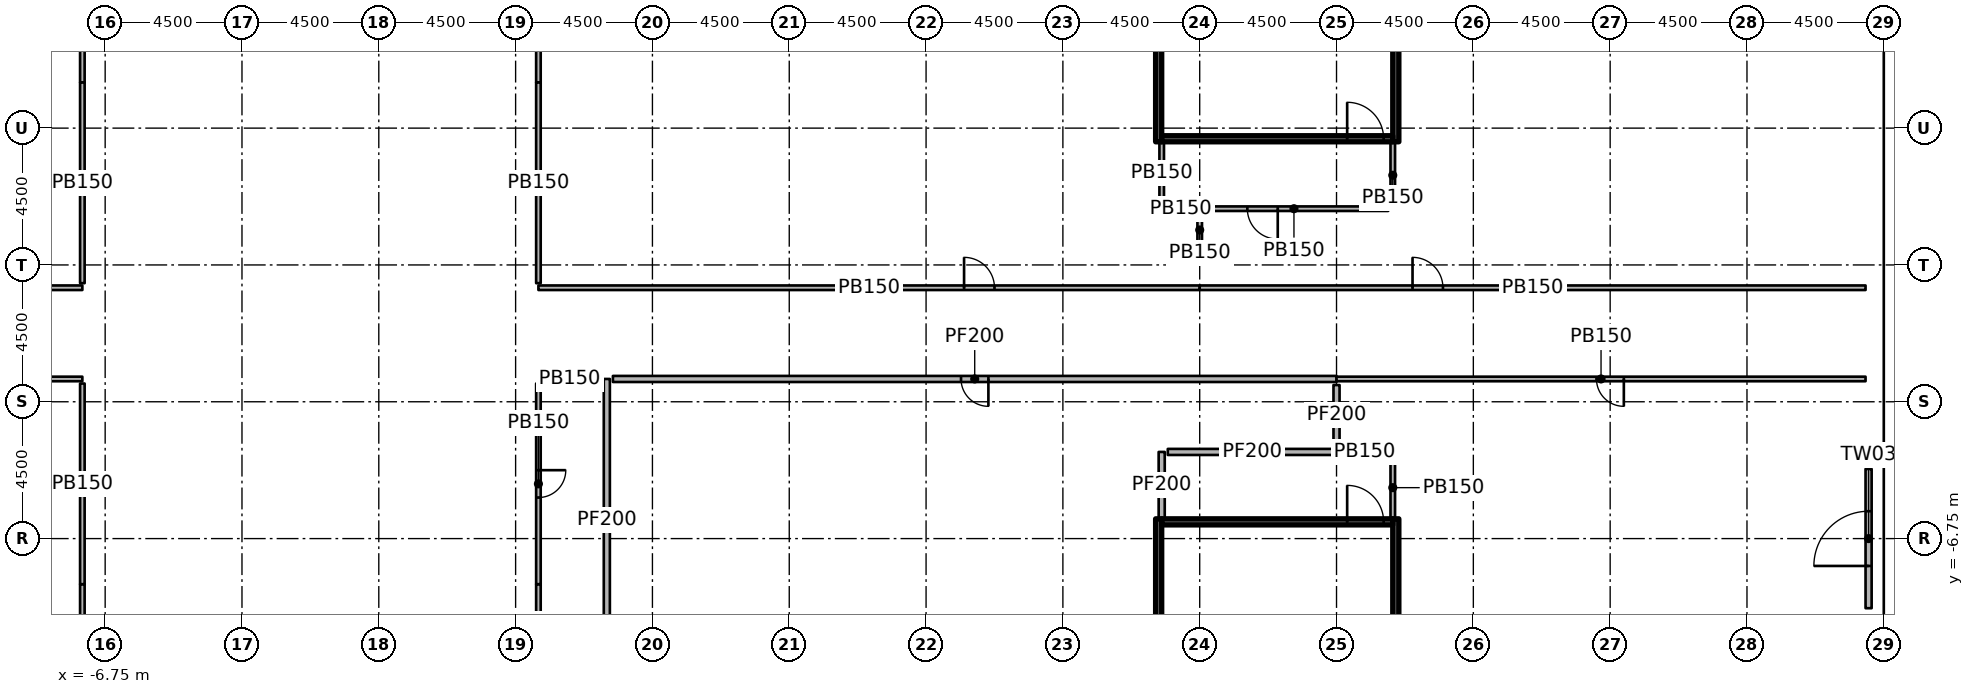
"""IFC4 building model, lengths in metres.
Left out: names, types, materials, properties, quantities, classifications, styles, units other than length and angle.
Written with IfcOpenShell. Run it as: python <this file> out.ifc"""

import sys

from ifc_helpers import new_model, si_unit, direction, frame, frame_2d, origin, origin_2d, place, context, subcontext, project, spatial, rectangle, extrude, element, fill, save


model = new_model("IFC4")
c1 = context("Model", 3, precision=1e-05, world=origin(), true_north=direction((0.0, 1.0)))
c2 = subcontext(c1, "Body", "Model", "MODEL_VIEW")
j1 = project(units=[si_unit("LENGTHUNIT", "METRE"), si_unit("PLANEANGLEUNIT", "RADIAN")], contexts=[c1])
p1 = place(None, origin())
s1 = spatial("IfcSite", under=j1, at=p1, CompositionType="ELEMENT")
p2 = place(p1, origin())
s2 = spatial("IfcBuilding", under=s1, at=p2, CompositionType="ELEMENT")
p3 = place(p2, frame((0.0, 0.0, 7.0)))
s3 = spatial("IfcBuildingStorey", under=s2, at=p3, CompositionType="ELEMENT", Elevation=7.0)
for number, where, z_axis, x_axis in (
    (1, (-6.25, -6.25, 0.0), (0.0, 0.0, 1.0), (1.0, 0.0, 0.0)),
    (2, (-6.25, 6.25, 0.0), (0.0, 0.0, 1.0), (1.0, 0.0, 0.0)),
    (3, (6.25, -6.25, 0.0), (0.0, 0.0, 1.0), (1.0, 0.0, 0.0)),
    (4, (6.25, 6.25, 0.0), (0.0, 0.0, 1.0), (1.0, 0.0, 0.0)),
    (5, (10.75, -6.25, 0.0), (0.0, 0.0, 1.0), (1.0, 0.0, 0.0)),
    (6, (10.75, 6.25, 0.0), (0.0, 0.0, 1.0), (1.0, 0.0, 0.0)),
    (7, (15.75, -6.25, 0.0), (0.0, 0.0, 1.0), (1.0, 0.0, 0.0)),
    (8, (15.75, 6.25, 0.0), (0.0, 0.0, 1.0), (1.0, 0.0, 0.0)),
    (9, (20.25, -6.11, 0.0), (0.0, 0.0, 1.0), (1.0, 0.0, 0.0)),
    (10, (20.25, 6.11, 0.0), (0.0, 0.0, 1.0), (1.0, 0.0, 0.0)),
    (11, (24.75, -6.11, 0.0), (0.0, 0.0, 1.0), (1.0, 0.0, 0.0)),
    (12, (24.75, 6.11, 0.0), (0.0, 0.0, 1.0), (1.0, 0.0, 0.0)),
    (13, (28.908, -5.475, 0.0), (0.0, 0.0, 1.0), (1.0, 0.0, 0.0)),
    (14, (28.67, -2.25, 0.0), (0.0, 0.0, 1.0), (1.0, 0.0, 0.0)),
    (15, (28.67, 2.25, 0.0), (0.0, 0.0, 1.0), (1.0, 0.0, 0.0)),
    (16, (28.908, 5.475, 0.0), (0.0, 0.0, 1.0), (1.0, 0.0, 0.0)),
    (17, (33.11, -2.25, 0.0), (0.0, 0.0, 1.0), (1.0, 0.0, 0.0)),
    (18, (33.11, 2.25, 0.0), (0.0, 0.0, 1.0), (1.0, 0.0, 0.0)),
    (19, (37.47, 6.75, 0.0), (0.0, 0.0, 1.0), (1.0, 0.0, 0.0)),
    (20, (42.15, 2.25, 0.0), (0.0, 0.0, 1.0), (1.0, 0.0, 0.0)),
    (21, (46.65, -2.25, 0.0), (0.0, 0.0, 1.0), (1.0, 0.0, 0.0)),
    (22, (51.15, 6.75, 0.0), (0.0, 0.0, 1.0), (1.0, 0.0, 0.0)),
):
    element("IfcColumn", number, at=place(p3, frame(where, z_axis=z_axis, x_axis=x_axis)), inside=s3, PredefinedType="COLUMN", context=c2, shape_type="SweptSolid", body=[
        extrude(rectangle(XDim=1.2, YDim=1.2, at=origin_2d()), origin(), (0.0, 0.0, 1.0), 4.55),
    ])
p4 = place(p3, frame((51.25, -9.04, 0.0), z_axis=(0.0, 0.0, 1.0), x_axis=(0.0, 1.0, 0.0)))
e23 = element("IfcWall", 23, at=p4, inside=s3, PredefinedType="SOLIDWALL", context=c2, shape_type="SweptSolid", body=[
    extrude(rectangle(XDim=4.58, YDim=0.2, at=frame_2d((2.29, 0.0))), origin(), (0.0, 0.0, 1.0), 4.55),
])
p5 = place(p4, frame((1.39, 0.0, 0.0)))
e24 = element("IfcOpeningElement", 24, at=p5, cuts=e23, PredefinedType="OPENING", context=c2, shape_type="SweptSolid", body=[
    extrude(rectangle(XDim=1.8, YDim=2.4, at=frame_2d((0.9, 1.2))), frame((0.0, 0.11, 0.0), z_axis=(0.0, -1.0, 0.0), x_axis=(1.0, 0.0, 0.0)), (0.0, 0.0, 1.0), 0.22),
])
for number, where, z_axis, x_axis in (
    (25, (27.9, 6.3, 0.0), (0.0, 0.0, 1.0), (0.0, 1.0, 0.0)),
    (26, (35.7, 6.3, 0.0), (0.0, 0.0, 1.0), (0.0, 1.0, 0.0)),
):
    element("IfcWall", number, at=place(p3, frame(where, z_axis=z_axis, x_axis=x_axis)), inside=s3, PredefinedType="SHEAR", context=c2, shape_type="SweptSolid", body=[
        extrude(rectangle(XDim=4.6, YDim=0.2, at=frame_2d((2.3, 0.0))), origin(), (0.0, 0.0, 1.0), 4.55),
    ])
p6 = place(p3, frame((28.0, 6.4, 0.0), z_axis=(0.0, 0.0, 1.0), x_axis=(1.0, 0.0, 0.0)))
e27 = element("IfcWall", 27, at=p6, inside=s3, PredefinedType="SHEAR", context=c2, shape_type="SweptSolid", body=[
    extrude(rectangle(XDim=7.6, YDim=0.2, at=frame_2d((3.8, 0.0))), origin(), (0.0, 0.0, 1.0), 4.55),
])
p7 = place(p6, frame((6.1, 0.0, 0.0)))
e28 = element("IfcOpeningElement", 28, at=p7, cuts=e27, PredefinedType="OPENING", context=c2, shape_type="SweptSolid", body=[
    extrude(rectangle(XDim=1.2, YDim=2.1, at=frame_2d((0.6, 1.05))), frame((0.0, 0.11, 0.0), z_axis=(0.0, -1.0, 0.0), x_axis=(1.0, 0.0, 0.0)), (0.0, 0.0, 1.0), 0.22),
])
for number, where, z_axis, x_axis in (
    (29, (27.9, -10.7, 0.0), (0.0, 0.0, 1.0), (0.0, 1.0, 0.0)),
    (30, (35.7, -10.7, 0.0), (0.0, 0.0, 1.0), (0.0, 1.0, 0.0)),
):
    element("IfcWall", number, at=place(p3, frame(where, z_axis=z_axis, x_axis=x_axis)), inside=s3, PredefinedType="SHEAR", context=c2, shape_type="SweptSolid", body=[
        extrude(rectangle(XDim=4.6, YDim=0.2, at=frame_2d((2.3, 0.0))), origin(), (0.0, 0.0, 1.0), 4.55),
    ])
p8 = place(p3, frame((28.0, -6.2, 0.0), z_axis=(0.0, 0.0, 1.0), x_axis=(1.0, 0.0, 0.0)))
e31 = element("IfcWall", 31, at=p8, inside=s3, PredefinedType="SHEAR", context=c2, shape_type="SweptSolid", body=[
    extrude(rectangle(XDim=7.6, YDim=0.2, at=frame_2d((3.8, 0.0))), origin(), (0.0, 0.0, 1.0), 4.55),
])
p9 = place(p8, frame((6.1, 0.0, 0.0)))
e32 = element("IfcOpeningElement", 32, at=p9, cuts=e31, PredefinedType="OPENING", context=c2, shape_type="SweptSolid", body=[
    extrude(rectangle(XDim=1.2, YDim=2.1, at=frame_2d((0.6, 1.05))), frame((0.0, 0.11, 0.0), z_axis=(0.0, -1.0, 0.0), x_axis=(1.0, 0.0, 0.0)), (0.0, 0.0, 1.0), 0.22),
])
p10 = place(p3, frame((29.25, 4.1, 0.0), z_axis=(0.0, 0.0, 1.0), x_axis=(-1.0, 0.0, 0.0)))
e33 = element("IfcWall", 33, at=p10, inside=s3, PredefinedType="PARTITIONING", context=c2, shape_type="SweptSolid", body=[
    extrude(rectangle(XDim=1.25, YDim=0.15, at=frame_2d((0.625, 0.0))), origin(), (0.0, 0.0, 1.0), 4.55),
])
p11 = place(p3, frame((28.0, 4.25, 0.0), z_axis=(0.0, 0.0, 1.0), x_axis=(0.0, 1.0, 0.0)))
e34 = element("IfcWall", 34, at=p11, inside=s3, PredefinedType="PARTITIONING", context=c2, shape_type="SweptSolid", body=[
    extrude(rectangle(XDim=2.05, YDim=0.15, at=frame_2d((1.025, 0.0))), origin(), (0.0, 0.0, 1.0), 4.55),
])
p12 = place(p3, frame((35.6, 6.3, 0.0), z_axis=(0.0, 0.0, 1.0), x_axis=(0.0, -1.0, 0.0)))
e35 = element("IfcWall", 35, at=p12, inside=s3, PredefinedType="PARTITIONING", context=c2, shape_type="SweptSolid", body=[
    extrude(rectangle(XDim=2.2, YDim=0.15, at=frame_2d((1.1, 0.0))), origin(), (0.0, 0.0, 1.0), 4.55),
])
p13 = place(p3, frame((35.45, 4.1, 0.0), z_axis=(0.0, 0.0, 1.0), x_axis=(-1.0, 0.0, 0.0)))
e36 = element("IfcWall", 36, at=p13, inside=s3, PredefinedType="PARTITIONING", context=c2, shape_type="SweptSolid", body=[
    extrude(rectangle(XDim=6.2, YDim=0.15, at=frame_2d((3.1, 0.0))), origin(), (0.0, 0.0, 1.0), 4.55),
])
p14 = place(p13, frame((3.633, 0.0, 0.0)))
e37 = element("IfcOpeningElement", 37, at=p14, cuts=e36, PredefinedType="OPENING", context=c2, shape_type="SweptSolid", body=[
    extrude(rectangle(XDim=1.0, YDim=2.1, at=frame_2d((0.5, 1.05))), frame((0.0, 0.085, 0.0), z_axis=(0.0, -1.0, 0.0), x_axis=(1.0, 0.0, 0.0)), (0.0, 0.0, 1.0), 0.17),
])
p15 = place(p3, frame((28.0, -6.1, 0.0), z_axis=(0.0, 0.0, 1.0), x_axis=(0.0, 1.0, 0.0)))
e38 = element("IfcWall", 38, at=p15, inside=s3, PredefinedType="PARTITIONING", context=c2, shape_type="SweptSolid", body=[
    extrude(rectangle(XDim=2.2, YDim=0.2, at=frame_2d((1.1, 0.0))), origin(), (0.0, 0.0, 1.0), 4.55),
])
p16 = place(p3, frame((28.2, -3.9, 0.0), z_axis=(0.0, 0.0, 1.0), x_axis=(1.0, 0.0, 0.0)))
e39 = element("IfcWall", 39, at=p16, inside=s3, PredefinedType="PARTITIONING", context=c2, shape_type="SweptSolid", body=[
    extrude(rectangle(XDim=5.55, YDim=0.2, at=frame_2d((2.775, 0.0))), origin(), (0.0, 0.0, 1.0), 4.55),
])
p17 = place(p3, frame((33.75, -3.9, 0.0), z_axis=(0.0, 0.0, 1.0), x_axis=(1.0, 0.0, 0.0)))
e40 = element("IfcWall", 40, at=p17, inside=s3, PredefinedType="PARTITIONING", context=c2, shape_type="SweptSolid", body=[
    extrude(rectangle(XDim=1.85, YDim=0.15, at=frame_2d((0.925, 0.0))), origin(), (0.0, 0.0, 1.0), 4.55),
])
p18 = place(p3, frame((35.6, -4.05, 0.0), z_axis=(0.0, 0.0, 1.0), x_axis=(0.0, -1.0, 0.0)))
e41 = element("IfcWall", 41, at=p18, inside=s3, PredefinedType="PARTITIONING", context=c2, shape_type="SweptSolid", body=[
    extrude(rectangle(XDim=2.05, YDim=0.15, at=frame_2d((1.025, 0.0))), origin(), (0.0, 0.0, 1.0), 4.55),
])
p19 = place(p3, frame((9.75, -10.8, 0.0), z_axis=(0.0, 0.0, 1.0), x_axis=(0.0, 1.0, 0.0)))
e42 = element("IfcWall", 42, at=p19, inside=s3, PredefinedType="PARTITIONING", context=c2, shape_type="SweptSolid", body=[
    extrude(rectangle(XDim=9.3, YDim=0.2, at=frame_2d((4.65, 0.0))), origin(), (0.0, 0.0, 1.0), 4.55),
])
p20 = place(p3, frame((33.75, -1.5, 0.0), z_axis=(0.0, 0.0, 1.0), x_axis=(-1.0, 0.0, 0.0)))
e43 = element("IfcWall", 43, at=p20, inside=s3, PredefinedType="PARTITIONING", context=c2, shape_type="SweptSolid", body=[
    extrude(rectangle(XDim=23.8, YDim=0.2, at=frame_2d((11.9, 0.0))), origin(), (0.0, 0.0, 1.0), 4.55),
])
p21 = place(p20, frame((11.45, 0.0, 0.0)))
e44 = element("IfcOpeningElement", 44, at=p21, cuts=e43, PredefinedType="OPENING", context=c2, shape_type="SweptSolid", body=[
    extrude(rectangle(XDim=0.9, YDim=2.1, at=frame_2d((0.45, 1.05))), frame((0.0, 0.11, 0.0), z_axis=(0.0, -1.0, 0.0), x_axis=(1.0, 0.0, 0.0)), (0.0, 0.0, 1.0), 0.22),
])
p22 = place(p3, frame((33.75, -1.7, 0.0), z_axis=(0.0, 0.0, 1.0), x_axis=(0.0, -1.0, 0.0)))
e45 = element("IfcWall", 45, at=p22, inside=s3, PredefinedType="PARTITIONING", context=c2, shape_type="SweptSolid", body=[
    extrude(rectangle(XDim=2.0, YDim=0.2, at=frame_2d((1.0, 0.0))), origin(), (0.0, 0.0, 1.0), 4.55),
])
p23 = place(p3, frame((7.5, -10.85, 0.0), z_axis=(0.0, 0.0, 1.0), x_axis=(0.0, 1.0, 0.0)))
e46 = element("IfcWall", 46, at=p23, inside=s3, PredefinedType="PARTITIONING", context=c2, shape_type="SweptSolid", body=[
    extrude(rectangle(XDim=2.6, YDim=0.15, at=frame_2d((1.3, 0.0))), origin(), (0.0, 0.0, 1.0), 4.55),
])
p24 = place(p3, frame((7.5, -1.5, 0.0), z_axis=(0.0, 0.0, 1.0), x_axis=(1.0, 0.0, 0.0)))
e47 = element("IfcWall", 47, at=p24, inside=s3, PredefinedType="PARTITIONING", context=c2, shape_type="SweptSolid", body=[
    extrude(rectangle(XDim=2.05, YDim=0.15, at=frame_2d((1.025, 0.0))), origin(), (0.0, 0.0, 1.0), 4.55),
])
p25 = place(p3, frame((7.5, -1.65, 0.0), z_axis=(0.0, 0.0, 1.0), x_axis=(0.0, -1.0, 0.0)))
e48 = element("IfcWall", 48, at=p25, inside=s3, PredefinedType="PARTITIONING", context=c2, shape_type="SweptSolid", body=[
    extrude(rectangle(XDim=6.6, YDim=0.15, at=frame_2d((3.3, 0.0))), origin(), (0.0, 0.0, 1.0), 4.55),
])
p26 = place(p25, frame((2.85, 0.0, 0.0)))
e49 = element("IfcOpeningElement", 49, at=p26, cuts=e48, PredefinedType="OPENING", context=c2, shape_type="SweptSolid", body=[
    extrude(rectangle(XDim=0.9, YDim=2.1, at=frame_2d((0.45, 1.05))), frame((0.0, 0.085, 0.0), z_axis=(0.0, -1.0, 0.0), x_axis=(1.0, 0.0, 0.0)), (0.0, 0.0, 1.0), 0.17),
])
p27 = place(p3, frame((7.5, 30.0, 0.0), z_axis=(0.0, 0.0, 1.0), x_axis=(0.0, -1.0, 0.0)))
e50 = element("IfcWall", 50, at=p27, inside=s3, PredefinedType="PARTITIONING", context=c2, shape_type="SweptSolid", body=[
    extrude(rectangle(XDim=21.75, YDim=0.15, at=frame_2d((10.875, 0.0))), origin(), (0.0, 0.0, 1.0), 4.55),
])
p28 = place(p27, frame((6.75, 0.0, 0.0)))
e51 = element("IfcOpeningElement", 51, at=p28, cuts=e50, PredefinedType="OPENING", context=c2, shape_type="SweptSolid", body=[
    extrude(rectangle(XDim=1.0, YDim=2.1, at=frame_2d((0.5, 1.05))), frame((0.0, 0.085, 0.0), z_axis=(0.0, -1.0, 0.0), x_axis=(1.0, 0.0, 0.0)), (0.0, 0.0, 1.0), 0.17),
])
p29 = place(p3, frame((-7.5, 8.25, 0.0), z_axis=(0.0, 0.0, 1.0), x_axis=(0.0, 1.0, 0.0)))
e52 = element("IfcWall", 52, at=p29, inside=s3, PredefinedType="PARTITIONING", context=c2, shape_type="SweptSolid", body=[
    extrude(rectangle(XDim=21.75, YDim=0.15, at=frame_2d((10.875, 0.0))), origin(), (0.0, 0.0, 1.0), 4.55),
])
p30 = place(p29, frame((5.75, 0.0, 0.0)))
e53 = element("IfcOpeningElement", 53, at=p30, cuts=e52, PredefinedType="OPENING", context=c2, shape_type="SweptSolid", body=[
    extrude(rectangle(XDim=1.0, YDim=2.1, at=frame_2d((0.5, 1.05))), frame((0.0, 0.085, 0.0), z_axis=(0.0, -1.0, 0.0), x_axis=(1.0, 0.0, 0.0)), (0.0, 0.0, 1.0), 0.17),
])
p31 = place(p3, frame((-7.5, -32.25, 0.0), z_axis=(0.0, 0.0, 1.0), x_axis=(0.0, 1.0, 0.0)))
e54 = element("IfcWall", 54, at=p31, inside=s3, PredefinedType="PARTITIONING", context=c2, shape_type="SweptSolid", body=[
    extrude(rectangle(XDim=24.0, YDim=0.15, at=frame_2d((12.0, 0.0))), origin(), (0.0, 0.0, 1.0), 4.55),
])
p32 = place(p31, frame((12.75, 0.0, 0.0)))
e55 = element("IfcOpeningElement", 55, at=p32, cuts=e54, PredefinedType="OPENING", context=c2, shape_type="SweptSolid", body=[
    extrude(rectangle(XDim=0.9, YDim=2.1, at=frame_2d((0.45, 1.05))), frame((0.0, 0.085, 0.0), z_axis=(0.0, -1.0, 0.0), x_axis=(1.0, 0.0, 0.0)), (0.0, 0.0, 1.0), 0.17),
])
p33 = place(p3, frame((7.5, 1.5, 0.0), z_axis=(0.0, 0.0, 1.0), x_axis=(1.0, 0.0, 0.0)))
e56 = element("IfcWall", 56, at=p33, inside=s3, PredefinedType="PARTITIONING", context=c2, shape_type="SweptSolid", body=[
    extrude(rectangle(XDim=21.75, YDim=0.15, at=frame_2d((10.875, 0.0))), origin(), (0.0, 0.0, 1.0), 4.55),
])
p34 = place(p33, frame((14.0, 0.0, 0.0)))
e57 = element("IfcOpeningElement", 57, at=p34, cuts=e56, PredefinedType="OPENING", context=c2, shape_type="SweptSolid", body=[
    extrude(rectangle(XDim=1.0, YDim=2.1, at=frame_2d((0.5, 1.05))), frame((0.0, 0.085, 0.0), z_axis=(0.0, -1.0, 0.0), x_axis=(1.0, 0.0, 0.0)), (0.0, 0.0, 1.0), 0.17),
])
p35 = place(p3, frame((29.25, 1.5, 0.0), z_axis=(0.0, 0.0, 1.0), x_axis=(1.0, 0.0, 0.0)))
e58 = element("IfcWall", 58, at=p35, inside=s3, PredefinedType="PARTITIONING", context=c2, shape_type="SweptSolid", body=[
    extrude(rectangle(XDim=21.9, YDim=0.15, at=frame_2d((10.95, 0.0))), origin(), (0.0, 0.0, 1.0), 4.55),
])
p36 = place(p35, frame((7.0, 0.0, 0.0)))
e59 = element("IfcOpeningElement", 59, at=p36, cuts=e58, PredefinedType="OPENING", context=c2, shape_type="SweptSolid", body=[
    extrude(rectangle(XDim=1.0, YDim=2.1, at=frame_2d((0.5, 1.05))), frame((0.0, 0.085, 0.0), z_axis=(0.0, -1.0, 0.0), x_axis=(1.0, 0.0, 0.0)), (0.0, 0.0, 1.0), 0.17),
])
p37 = place(p3, frame((51.15, -1.5, 0.0), z_axis=(0.0, 0.0, 1.0), x_axis=(-1.0, 0.0, 0.0)))
e60 = element("IfcWall", 60, at=p37, inside=s3, PredefinedType="PARTITIONING", context=c2, shape_type="SweptSolid", body=[
    extrude(rectangle(XDim=17.4, YDim=0.15, at=frame_2d((8.7, 0.0))), origin(), (0.0, 0.0, 1.0), 4.55),
])
p38 = place(p37, frame((7.95, 0.0, 0.0)))
e61 = element("IfcOpeningElement", 61, at=p38, cuts=e60, PredefinedType="OPENING", context=c2, shape_type="SweptSolid", body=[
    extrude(rectangle(XDim=0.9, YDim=2.1, at=frame_2d((0.45, 1.05))), frame((0.0, 0.085, 0.0), z_axis=(0.0, -1.0, 0.0), x_axis=(1.0, 0.0, 0.0)), (0.0, 0.0, 1.0), 0.17),
])
p39 = place(p3, frame((-24.75, 1.5, 0.0), z_axis=(0.0, 0.0, 1.0), x_axis=(1.0, 0.0, 0.0)))
e62 = element("IfcWall", 62, at=p39, inside=s3, PredefinedType="PARTITIONING", context=c2, shape_type="SweptSolid", body=[
    extrude(rectangle(XDim=17.25, YDim=0.15, at=frame_2d((8.625, 0.0))), origin(), (0.0, 0.0, 1.0), 4.55),
])
p40 = place(p39, frame((11.0, 0.0, 0.0)))
e63 = element("IfcOpeningElement", 63, at=p40, cuts=e62, PredefinedType="OPENING", context=c2, shape_type="SweptSolid", body=[
    extrude(rectangle(XDim=1.0, YDim=2.1, at=frame_2d((0.5, 1.05))), frame((0.0, 0.085, 0.0), z_axis=(0.0, -1.0, 0.0), x_axis=(1.0, 0.0, 0.0)), (0.0, 0.0, 1.0), 0.17),
])
p41 = place(p3, frame((-7.5, -1.5, 0.0), z_axis=(0.0, 0.0, 1.0), x_axis=(-1.0, 0.0, 0.0)))
e64 = element("IfcWall", 64, at=p41, inside=s3, PredefinedType="PARTITIONING", context=c2, shape_type="SweptSolid", body=[
    extrude(rectangle(XDim=19.5, YDim=0.15, at=frame_2d((9.75, 0.0))), origin(), (0.0, 0.0, 1.0), 4.55),
])
p42 = place(p3, frame((29.25, 3.95, 0.0), z_axis=(0.0, 0.0, 1.0), x_axis=(0.0, -1.0, 0.0)))
e65 = element("IfcWall", 65, at=p42, inside=s3, PredefinedType="PARTITIONING", context=c2, shape_type="SweptSolid", body=[
    extrude(rectangle(XDim=1.1, YDim=0.15, at=frame_2d((0.55, 0.0))), origin(), (0.0, 0.0, 1.0), 4.55),
])
for number, where, z_axis, x_axis in (
    (66, (7.5, 1.65, 0.0), (0.0, 0.0, 1.0), (0.0, 1.0, 0.0)),
    (67, (-7.5, 8.25, 0.0), (0.0, 0.0, 1.0), (0.0, -1.0, 0.0)),
    (68, (-7.5, -1.65, 0.0), (0.0, 0.0, 1.0), (0.0, -1.0, 0.0)),
):
    element("IfcWall", number, at=place(p3, frame(where, z_axis=z_axis, x_axis=x_axis)), inside=s3, PredefinedType="PARTITIONING", context=c2, shape_type="SweptSolid", body=[
        extrude(rectangle(XDim=6.6, YDim=0.15, at=frame_2d((3.3, 0.0))), origin(), (0.0, 0.0, 1.0), 4.55),
    ])
p43 = place(p5, origin())
e69 = element("IfcDoor", 69, at=p43, inside=s3, OperationType="SINGLE_SWING_LEFT", PredefinedType="DOOR", context=c2, shape_type="SweptSolid", body=[
    extrude(rectangle(XDim=1.8, YDim=2.4, at=frame_2d((0.9, 1.2))), frame((0.0, 0.025, 0.0), z_axis=(0.0, -1.0, 0.0), x_axis=(1.0, 0.0, 0.0)), (0.0, 0.0, 1.0), 0.05),
])
fill(e24, e69)
p44 = place(p7, origin())
e70 = element("IfcDoor", 70, at=p44, inside=s3, OperationType="SINGLE_SWING_RIGHT", PredefinedType="DOOR", context=c2, shape_type="SweptSolid", body=[
    extrude(rectangle(XDim=1.2, YDim=2.1, at=frame_2d((0.6, 1.05))), frame((0.0, 0.025, 0.0), z_axis=(0.0, -1.0, 0.0), x_axis=(1.0, 0.0, 0.0)), (0.0, 0.0, 1.0), 0.05),
])
fill(e28, e70)
p45 = place(p9, origin())
e71 = element("IfcDoor", 71, at=p45, inside=s3, OperationType="SINGLE_SWING_RIGHT", PredefinedType="DOOR", context=c2, shape_type="SweptSolid", body=[
    extrude(rectangle(XDim=1.2, YDim=2.1, at=frame_2d((0.6, 1.05))), frame((0.0, 0.025, 0.0), z_axis=(0.0, -1.0, 0.0), x_axis=(1.0, 0.0, 0.0)), (0.0, 0.0, 1.0), 0.05),
])
fill(e32, e71)
p46 = place(p14, origin())
e72 = element("IfcDoor", 72, at=p46, inside=s3, OperationType="SINGLE_SWING_LEFT", PredefinedType="DOOR", context=c2, shape_type="SweptSolid", body=[
    extrude(rectangle(XDim=1.0, YDim=2.1, at=frame_2d((0.5, 1.05))), frame((0.0, 0.025, 0.0), z_axis=(0.0, -1.0, 0.0), x_axis=(1.0, 0.0, 0.0)), (0.0, 0.0, 1.0), 0.05),
])
fill(e37, e72)
p47 = place(p21, origin())
e73 = element("IfcDoor", 73, at=p47, inside=s3, OperationType="SINGLE_SWING_LEFT", PredefinedType="DOOR", context=c2, shape_type="SweptSolid", body=[
    extrude(rectangle(XDim=0.9, YDim=2.1, at=frame_2d((0.45, 1.05))), frame((0.0, 0.025, 0.0), z_axis=(0.0, -1.0, 0.0), x_axis=(1.0, 0.0, 0.0)), (0.0, 0.0, 1.0), 0.05),
])
fill(e44, e73)
p48 = place(p26, origin())
e74 = element("IfcDoor", 74, at=p48, inside=s3, OperationType="SINGLE_SWING_LEFT", PredefinedType="DOOR", context=c2, shape_type="SweptSolid", body=[
    extrude(rectangle(XDim=0.9, YDim=2.1, at=frame_2d((0.45, 1.05))), frame((0.0, 0.025, 0.0), z_axis=(0.0, -1.0, 0.0), x_axis=(1.0, 0.0, 0.0)), (0.0, 0.0, 1.0), 0.05),
])
fill(e49, e74)
p49 = place(p34, origin())
e75 = element("IfcDoor", 75, at=p49, inside=s3, OperationType="SINGLE_SWING_LEFT", PredefinedType="DOOR", context=c2, shape_type="SweptSolid", body=[
    extrude(rectangle(XDim=1.0, YDim=2.1, at=frame_2d((0.5, 1.05))), frame((0.0, 0.025, 0.0), z_axis=(0.0, -1.0, 0.0), x_axis=(1.0, 0.0, 0.0)), (0.0, 0.0, 1.0), 0.05),
])
fill(e57, e75)
p50 = place(p36, origin())
e76 = element("IfcDoor", 76, at=p50, inside=s3, OperationType="SINGLE_SWING_LEFT", PredefinedType="DOOR", context=c2, shape_type="SweptSolid", body=[
    extrude(rectangle(XDim=1.0, YDim=2.1, at=frame_2d((0.5, 1.05))), frame((0.0, 0.025, 0.0), z_axis=(0.0, -1.0, 0.0), x_axis=(1.0, 0.0, 0.0)), (0.0, 0.0, 1.0), 0.05),
])
fill(e59, e76)
p51 = place(p38, origin())
e77 = element("IfcDoor", 77, at=p51, inside=s3, OperationType="SINGLE_SWING_LEFT", PredefinedType="DOOR", context=c2, shape_type="SweptSolid", body=[
    extrude(rectangle(XDim=0.9, YDim=2.1, at=frame_2d((0.45, 1.05))), frame((0.0, 0.025, 0.0), z_axis=(0.0, -1.0, 0.0), x_axis=(1.0, 0.0, 0.0)), (0.0, 0.0, 1.0), 0.05),
])
fill(e61, e77)
save(model, sys.argv[1])
